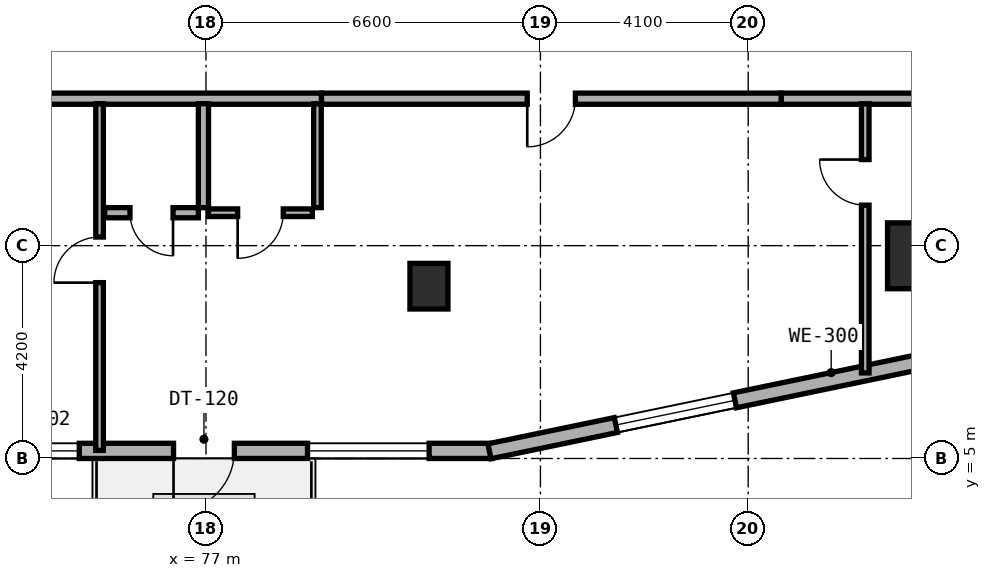
"""IFC4 building model, lengths in metres.
Left out: names, types, materials, properties, quantities, classifications, styles, units other than length and angle.
Written with IfcOpenShell. Run it as: python <this file> out.ifc"""

import sys

from ifc_helpers import new_model, si_unit, direction, frame, frame_2d, origin, origin_2d, place, context, subcontext, project, spatial, rectangle, extrude, element, fill, save


model = new_model("IFC4")
c1 = context("Model", 3, precision=1e-05, world=origin(), true_north=direction((0.0, 1.0)))
c2 = subcontext(c1, "Body", "Model", "MODEL_VIEW")
j1 = project(units=[si_unit("LENGTHUNIT", "METRE"), si_unit("PLANEANGLEUNIT", "RADIAN")], contexts=[c1])
p1 = place(None, origin())
s1 = spatial("IfcSite", under=j1, at=p1, CompositionType="ELEMENT")
p2 = place(p1, origin())
s2 = spatial("IfcBuilding", under=s1, at=p2, CompositionType="ELEMENT")
p3 = place(p2, frame((0.0, 0.0, 48.5)))
s3 = spatial("IfcBuildingStorey", under=s2, at=p3, CompositionType="ELEMENT", Elevation=48.5)
p4 = place(p3, frame((81.4, 8.4, 0.0), z_axis=(0.0, 0.0, 1.0), x_axis=(1.0, 0.0, 0.0)))
e1 = element("IfcColumn", 1, at=p4, inside=s3, PredefinedType="COLUMN", context=c2, shape_type="SweptSolid", body=[
    extrude(rectangle(XDim=0.75, YDim=0.9, at=origin_2d()), origin(), (0.0, 0.0, 1.0), 3.5),
])
p5 = place(p3, frame((91.0, 9.0, 0.0), z_axis=(0.0, 0.0, 1.0), x_axis=(1.0, 0.0, 0.0)))
e2 = element("IfcColumn", 2, at=p5, inside=s3, PredefinedType="COLUMN", context=c2, shape_type="SweptSolid", body=[
    extrude(rectangle(XDim=1.1, YDim=1.3, at=origin_2d()), origin(), (0.0, 0.0, 1.0), 3.5),
])
p6 = place(p3, frame((71.247, 5.15, 0.0), z_axis=(0.0, 0.0, 1.0), x_axis=(1.0, 0.0, 0.0)))
e3 = element("IfcWall", 3, at=p6, inside=s3, PredefinedType="STANDARD", context=c2, shape_type="SweptSolid", body=[
    extrude(rectangle(XDim=11.391, YDim=0.3, at=frame_2d((5.695, 0.0))), origin(), (0.0, 0.0, 1.0), 3.25),
])
p7 = place(p6, frame((5.113, 0.0, 0.0)))
e4 = element("IfcOpeningElement", 4, at=p7, cuts=e3, PredefinedType="OPENING", context=c2, shape_type="SweptSolid", body=[
    extrude(rectangle(XDim=1.2, YDim=2.15, at=frame_2d((0.6, 1.075))), frame((0.0, 0.16, 0.0), z_axis=(0.0, -1.0, 0.0), x_axis=(1.0, 0.0, 0.0)), (0.0, 0.0, 1.0), 0.32),
])
p8 = place(p6, frame((1.753, 0.0, 0.85)))
e5 = element("IfcOpeningElement", 5, at=p8, cuts=e3, PredefinedType="OPENING", context=c2, shape_type="SweptSolid", body=[
    extrude(rectangle(XDim=1.5, YDim=1.5, at=frame_2d((0.75, 0.75))), frame((0.0, 0.16, 0.0), z_axis=(0.0, -1.0, 0.0), x_axis=(1.0, 0.0, 0.0)), (0.0, 0.0, 1.0), 0.32),
])
p9 = place(p6, frame((7.757, 0.0, 0.8)))
e6 = element("IfcOpeningElement", 6, at=p9, cuts=e3, PredefinedType="OPENING", context=c2, shape_type="SweptSolid", body=[
    extrude(rectangle(XDim=2.4, YDim=1.6, at=frame_2d((1.2, 0.8))), frame((0.0, 0.16, 0.0), z_axis=(0.0, -1.0, 0.0), x_axis=(1.0, 0.0, 0.0)), (0.0, 0.0, 1.0), 0.32),
])
p10 = place(p3, frame((82.594, 5.142, 0.0), z_axis=(0.0, 0.0, 1.0), x_axis=(0.979125485139, 0.203256695712, 0.0)))
e7 = element("IfcWall", 7, at=p10, inside=s3, PredefinedType="STANDARD", context=c2, shape_type="SweptSolid", body=[
    extrude(rectangle(XDim=8.89, YDim=0.3, at=frame_2d((4.445, 0.0))), origin(), (0.0, 0.0, 1.0), 3.25),
])
p11 = place(p10, frame((2.548, 0.0, 0.8)))
e8 = element("IfcOpeningElement", 8, at=p11, cuts=e7, PredefinedType="OPENING", context=c2, shape_type="SweptSolid", body=[
    extrude(rectangle(XDim=2.4, YDim=1.6, at=frame_2d((1.2, 0.8))), frame((0.0, 0.16, 0.0), z_axis=(0.0, -1.0, 0.0), x_axis=(1.0, 0.0, 0.0)), (0.0, 0.0, 1.0), 0.32),
])
p12 = place(p3, frame((72.6, 12.1, 0.0), z_axis=(0.0, 0.0, 1.0), x_axis=(1.0, 0.0, 0.0)))
e9 = element("IfcWall", 9, at=p12, inside=s3, PredefinedType="SOLIDWALL", context=c2, shape_type="SweptSolid", body=[
    extrude(rectangle(XDim=6.68, YDim=0.22, at=frame_2d((3.34, 0.0))), origin(), (0.0, 0.0, 1.0), 2.725),
])
p13 = place(p3, frame((88.35, 12.1, 0.0), z_axis=(0.0, 0.0, 1.0), x_axis=(1.0, 0.0, 0.0)))
e10 = element("IfcWall", 10, at=p13, inside=s3, PredefinedType="SOLIDWALL", context=c2, shape_type="SweptSolid", body=[
    extrude(rectangle(XDim=7.41, YDim=0.22, at=frame_2d((3.705, 0.0))), origin(), (0.0, 0.0, 1.0), 2.865),
])
p14 = place(p3, frame((79.28, 12.1, 0.0), z_axis=(0.0, 0.0, 1.0), x_axis=(1.0, 0.0, 0.0)))
e11 = element("IfcWall", 11, at=p14, inside=s3, PredefinedType="SOLIDWALL", context=c2, shape_type="SweptSolid", body=[
    extrude(rectangle(XDim=9.07, YDim=0.22, at=frame_2d((4.535, 0.0))), origin(), (0.0, 0.0, 1.0), 2.725),
])
p15 = place(p14, frame((4.06, 0.0, 0.0)))
e12 = element("IfcOpeningElement", 12, at=p15, cuts=e11, PredefinedType="OPENING", context=c2, shape_type="SweptSolid", body=[
    extrude(rectangle(XDim=0.95, YDim=2.1, at=frame_2d((0.475, 1.05))), frame((0.0, 0.12, 0.0), z_axis=(0.0, -1.0, 0.0), x_axis=(1.0, 0.0, 0.0)), (0.0, 0.0, 1.0), 0.24),
])
p16 = place(p3, frame((74.9, 5.16, 0.0), z_axis=(0.0, 0.0, 1.0), x_axis=(0.0, 1.0, 0.0)))
e13 = element("IfcWall", 13, at=p16, inside=s3, PredefinedType="PARTITIONING", context=c2, shape_type="SweptSolid", body=[
    extrude(rectangle(XDim=6.84, YDim=0.15, at=frame_2d((3.42, 0.0))), origin(), (0.0, 0.0, 1.0), 2.865),
])
p17 = place(p16, frame((3.31, 0.0, 0.0)))
e14 = element("IfcOpeningElement", 14, at=p17, cuts=e13, PredefinedType="OPENING", context=c2, shape_type="SweptSolid", body=[
    extrude(rectangle(XDim=0.9, YDim=2.1, at=frame_2d((0.45, 1.05))), frame((0.0, 0.085, 0.0), z_axis=(0.0, -1.0, 0.0), x_axis=(1.0, 0.0, 0.0)), (0.0, 0.0, 1.0), 0.17),
])
p18 = place(p3, frame((90.01, 6.689, 0.0), z_axis=(0.0, 0.0, 1.0), x_axis=(0.0, 1.0, 0.0)))
e15 = element("IfcWall", 15, at=p18, inside=s3, PredefinedType="PARTITIONING", context=c2, shape_type="SweptSolid", body=[
    extrude(rectangle(XDim=5.311, YDim=0.15, at=frame_2d((2.656, 0.0))), origin(), (0.0, 0.0, 1.0), 2.865),
])
p19 = place(p18, frame((3.31, 0.0, 0.0)))
e16 = element("IfcOpeningElement", 16, at=p19, cuts=e15, PredefinedType="OPENING", context=c2, shape_type="SweptSolid", body=[
    extrude(rectangle(XDim=0.9, YDim=2.1, at=frame_2d((0.45, 1.05))), frame((0.0, 0.085, 0.0), z_axis=(0.0, -1.0, 0.0), x_axis=(1.0, 0.0, 0.0)), (0.0, 0.0, 1.0), 0.17),
])
p20 = place(p3, frame((76.95, 9.95, 0.0), z_axis=(0.0, 0.0, 1.0), x_axis=(0.0, 1.0, 0.0)))
e17 = element("IfcWall", 17, at=p20, inside=s3, PredefinedType="PLUMBINGWALL", context=c2, shape_type="SweptSolid", body=[
    extrude(rectangle(XDim=2.05, YDim=0.2, at=frame_2d((1.025, 0.0))), origin(), (0.0, 0.0, 1.0), 2.985),
])
p21 = place(p3, frame((79.2, 9.95, 0.0), z_axis=(0.0, 0.0, 1.0), x_axis=(0.0, 1.0, 0.0)))
e18 = element("IfcWall", 18, at=p21, inside=s3, PredefinedType="PARTITIONING", context=c2, shape_type="SweptSolid", body=[
    extrude(rectangle(XDim=2.05, YDim=0.15, at=frame_2d((1.025, 0.0))), origin(), (0.0, 0.0, 1.0), 2.985),
])
p22 = place(p3, frame((75.0, 9.85, 0.0), z_axis=(0.0, 0.0, 1.0), x_axis=(1.0, 0.0, 0.0)))
e19 = element("IfcWall", 19, at=p22, inside=s3, PredefinedType="PLUMBINGWALL", context=c2, shape_type="SweptSolid", body=[
    extrude(rectangle(XDim=1.85, YDim=0.2, at=frame_2d((0.925, 0.0))), origin(), (0.0, 0.0, 1.0), 3.22),
])
p23 = place(p22, frame((0.5, 0.0, 0.0)))
e20 = element("IfcOpeningElement", 20, at=p23, cuts=e19, PredefinedType="OPENING", context=c2, shape_type="SweptSolid", body=[
    extrude(rectangle(XDim=0.85, YDim=2.1, at=frame_2d((0.425, 1.05))), frame((0.0, 0.11, 0.0), z_axis=(0.0, -1.0, 0.0), x_axis=(1.0, 0.0, 0.0)), (0.0, 0.0, 1.0), 0.22),
])
p24 = place(p3, frame((77.05, 9.85, 0.0), z_axis=(0.0, 0.0, 1.0), x_axis=(1.0, 0.0, 0.0)))
e21 = element("IfcWall", 21, at=p24, inside=s3, PredefinedType="PARTITIONING", context=c2, shape_type="SweptSolid", body=[
    extrude(rectangle(XDim=2.05, YDim=0.15, at=frame_2d((1.025, 0.0))), origin(), (0.0, 0.0, 1.0), 3.22),
])
p25 = place(p24, frame((0.575, 0.0, 0.0)))
e22 = element("IfcOpeningElement", 22, at=p25, cuts=e21, PredefinedType="OPENING", context=c2, shape_type="SweptSolid", body=[
    extrude(rectangle(XDim=0.9, YDim=2.1, at=frame_2d((0.45, 1.05))), frame((0.0, 0.085, 0.0), z_axis=(0.0, -1.0, 0.0), x_axis=(1.0, 0.0, 0.0)), (0.0, 0.0, 1.0), 0.17),
])
p26 = place(p7, frame((1.2, 0.0, 0.0), z_axis=(0.0, 0.0, 1.0), x_axis=(-1.0, 0.0, 0.0)))
e23 = element("IfcDoor", 23, at=p26, inside=s3, OperationType="SINGLE_SWING_RIGHT", PredefinedType="DOOR", context=c2, shape_type="SweptSolid", body=[
    extrude(rectangle(XDim=1.2, YDim=2.15, at=frame_2d((0.6, 1.075))), frame((0.0, 0.025, 0.0), z_axis=(0.0, -1.0, 0.0), x_axis=(1.0, 0.0, 0.0)), (0.0, 0.0, 1.0), 0.05),
])
fill(e4, e23)
p27 = place(p8, origin())
e24 = element("IfcWindow", 24, at=p27, inside=s3, PartitioningType="SINGLE_PANEL", PredefinedType="WINDOW", context=c2, shape_type="SweptSolid", body=[
    extrude(rectangle(XDim=1.5, YDim=1.5, at=frame_2d((0.75, 0.75))), frame((0.0, 0.03, 0.0), z_axis=(0.0, -1.0, 0.0), x_axis=(1.0, 0.0, 0.0)), (0.0, 0.0, 1.0), 0.06),
])
fill(e5, e24)
p28 = place(p9, origin())
e25 = element("IfcWindow", 25, at=p28, inside=s3, PartitioningType="SINGLE_PANEL", PredefinedType="WINDOW", context=c2, shape_type="SweptSolid", body=[
    extrude(rectangle(XDim=2.4, YDim=1.6, at=frame_2d((1.2, 0.8))), frame((0.0, 0.03, 0.0), z_axis=(0.0, -1.0, 0.0), x_axis=(1.0, 0.0, 0.0)), (0.0, 0.0, 1.0), 0.06),
])
fill(e6, e25)
p29 = place(p11, origin())
e26 = element("IfcWindow", 26, at=p29, inside=s3, PartitioningType="SINGLE_PANEL", PredefinedType="WINDOW", context=c2, shape_type="SweptSolid", body=[
    extrude(rectangle(XDim=2.4, YDim=1.6, at=frame_2d((1.2, 0.8))), frame((0.0, 0.03, 0.0), z_axis=(0.0, -1.0, 0.0), x_axis=(1.0, 0.0, 0.0)), (0.0, 0.0, 1.0), 0.06),
])
fill(e8, e26)
p30 = place(p15, frame((0.95, 0.0, 0.0), z_axis=(0.0, 0.0, 1.0), x_axis=(-1.0, 0.0, 0.0)))
e27 = element("IfcDoor", 27, at=p30, inside=s3, OperationType="SINGLE_SWING_RIGHT", PredefinedType="DOOR", context=c2, shape_type="SweptSolid", body=[
    extrude(rectangle(XDim=0.95, YDim=2.1, at=frame_2d((0.475, 1.05))), frame((0.0, 0.025, 0.0), z_axis=(0.0, -1.0, 0.0), x_axis=(1.0, 0.0, 0.0)), (0.0, 0.0, 1.0), 0.05),
])
fill(e12, e27)
p31 = place(p17, origin())
e28 = element("IfcDoor", 28, at=p31, inside=s3, OperationType="SINGLE_SWING_LEFT", PredefinedType="DOOR", context=c2, shape_type="SweptSolid", body=[
    extrude(rectangle(XDim=0.9, YDim=2.1, at=frame_2d((0.45, 1.05))), frame((0.0, 0.025, 0.0), z_axis=(0.0, -1.0, 0.0), x_axis=(1.0, 0.0, 0.0)), (0.0, 0.0, 1.0), 0.05),
])
fill(e14, e28)
p32 = place(p19, origin())
e29 = element("IfcDoor", 29, at=p32, inside=s3, OperationType="SINGLE_SWING_RIGHT", PredefinedType="DOOR", context=c2, shape_type="SweptSolid", body=[
    extrude(rectangle(XDim=0.9, YDim=2.1, at=frame_2d((0.45, 1.05))), frame((0.0, 0.025, 0.0), z_axis=(0.0, -1.0, 0.0), x_axis=(1.0, 0.0, 0.0)), (0.0, 0.0, 1.0), 0.05),
])
fill(e16, e29)
p33 = place(p23, frame((0.85, 0.0, 0.0), z_axis=(0.0, 0.0, 1.0), x_axis=(-1.0, 0.0, 0.0)))
e30 = element("IfcDoor", 30, at=p33, inside=s3, OperationType="SINGLE_SWING_LEFT", PredefinedType="DOOR", context=c2, shape_type="SweptSolid", body=[
    extrude(rectangle(XDim=0.85, YDim=2.1, at=frame_2d((0.425, 1.05))), frame((0.0, 0.025, 0.0), z_axis=(0.0, -1.0, 0.0), x_axis=(1.0, 0.0, 0.0)), (0.0, 0.0, 1.0), 0.05),
])
fill(e20, e30)
p34 = place(p25, frame((0.9, 0.0, 0.0), z_axis=(0.0, 0.0, 1.0), x_axis=(-1.0, 0.0, 0.0)))
e31 = element("IfcDoor", 31, at=p34, inside=s3, OperationType="SINGLE_SWING_RIGHT", PredefinedType="DOOR", context=c2, shape_type="SweptSolid", body=[
    extrude(rectangle(XDim=0.9, YDim=2.1, at=frame_2d((0.45, 1.05))), frame((0.0, 0.025, 0.0), z_axis=(0.0, -1.0, 0.0), x_axis=(1.0, 0.0, 0.0)), (0.0, 0.0, 1.0), 0.05),
])
fill(e22, e31)
save(model, sys.argv[1])
